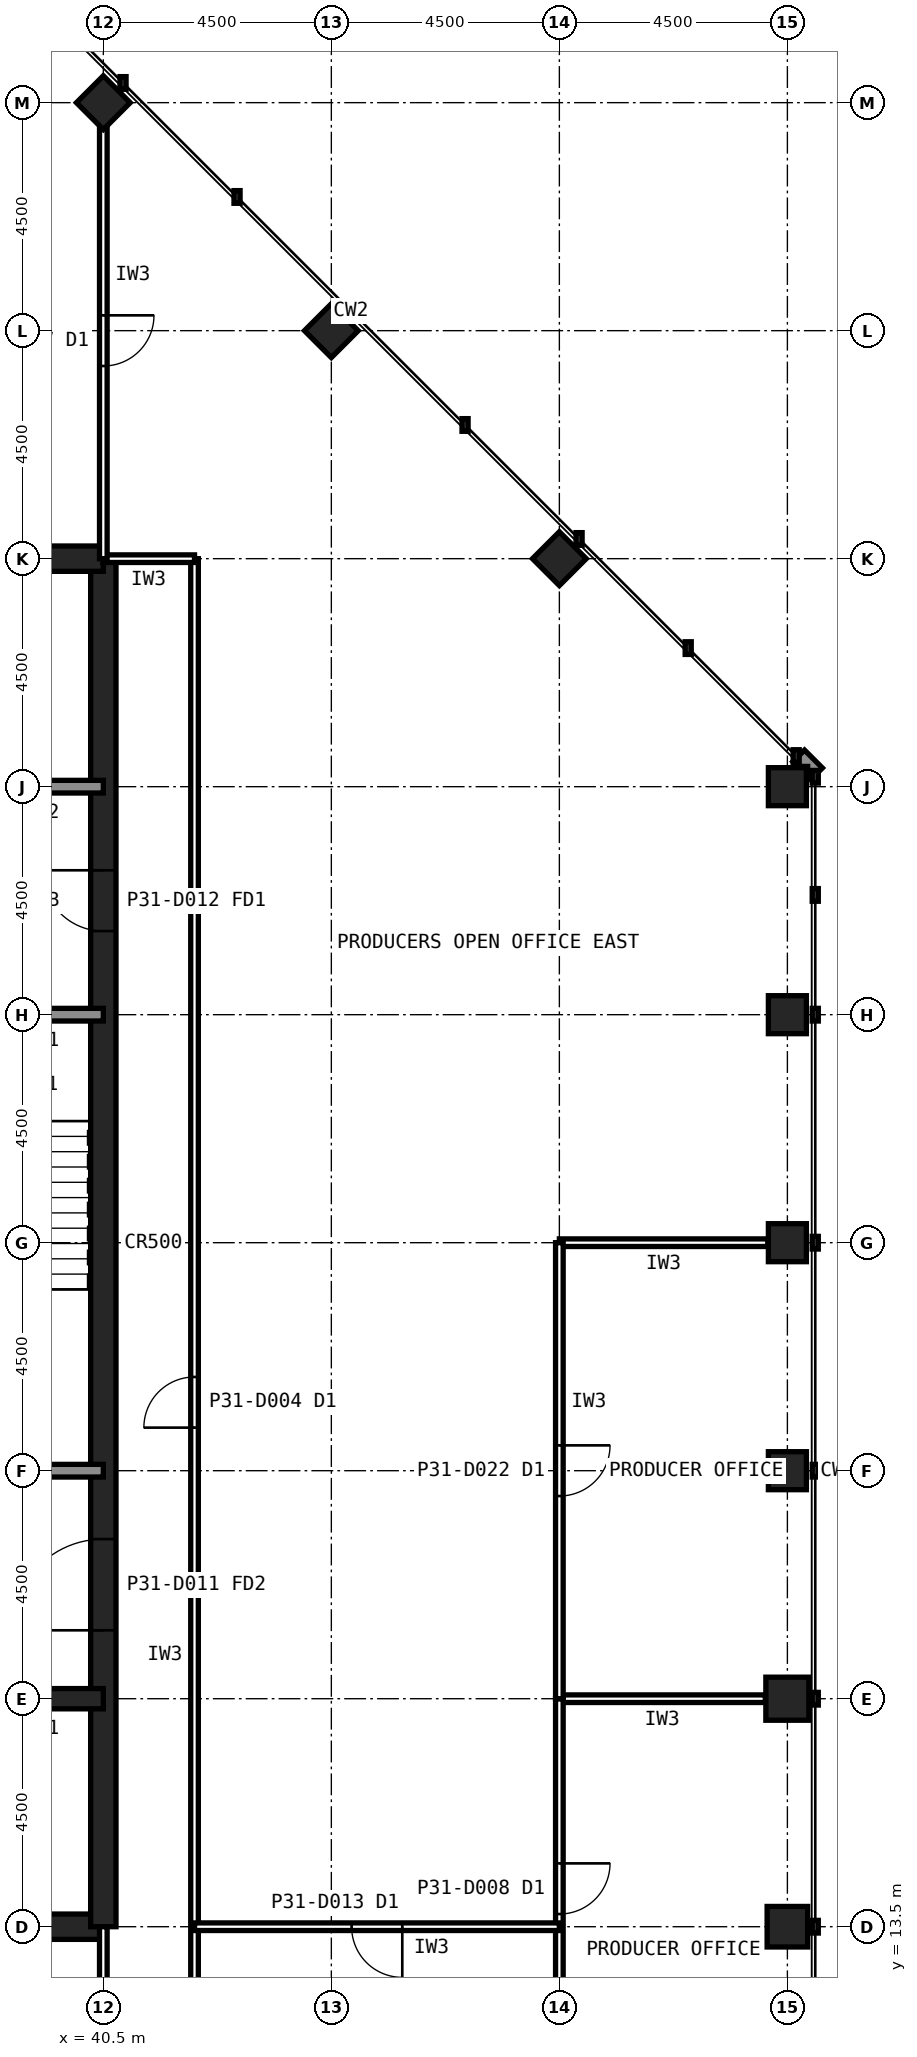
"""IFC4 building model, lengths in metres.
Left out: names, types, materials, properties, quantities, classifications, styles, units other than length and angle.
Written with IfcOpenShell. Run it as: python <this file> out.ifc"""

import sys

from ifc_helpers import new_model, si_unit, direction, frame, frame_2d, origin, origin_2d, place, context, subcontext, project, spatial, rectangle, hollow_rectangle, extrude, element, fill, save


model = new_model("IFC4")
c1 = context("Model", 3, precision=1e-05, world=origin(), true_north=direction((0.0, 1.0)))
c2 = subcontext(c1, "Body", "Model", "MODEL_VIEW")
j1 = project(units=[si_unit("LENGTHUNIT", "METRE"), si_unit("PLANEANGLEUNIT", "RADIAN")], contexts=[c1])
p1 = place(None, origin())
s1 = spatial("IfcSite", under=j1, at=p1, CompositionType="ELEMENT")
p2 = place(p1, origin())
s2 = spatial("IfcBuilding", under=s1, at=p2, CompositionType="ELEMENT")
p3 = place(p2, frame((0.0, 0.0, 135.6)))
s3 = spatial("IfcBuildingStorey", under=s2, at=p3, CompositionType="ELEMENT", Elevation=135.6)
p4 = place(p3, frame((54.0, 13.5, 0.0), z_axis=(0.0, 0.0, 1.0), x_axis=(1.0, 0.0, 0.0)))
e1 = element("IfcColumn", 1, at=p4, inside=s3, PredefinedType="COLUMN", context=c2, shape_type="SweptSolid", body=[
    extrude(hollow_rectangle(XDim=0.8, YDim=0.8, WallThickness=0.045, at=origin_2d()), origin(), (0.0, 0.0, 1.0), 4.0),
])
p5 = place(p3, frame((54.0, 18.0, 0.0), z_axis=(0.0, 0.0, 1.0), x_axis=(1.0, 0.0, 0.0)))
e2 = element("IfcColumn", 2, at=p5, inside=s3, PredefinedType="COLUMN", context=c2, shape_type="SweptSolid", body=[
    extrude(hollow_rectangle(XDim=0.85, YDim=0.85, WallThickness=0.05, at=origin_2d()), origin(), (0.0, 0.0, 1.0), 4.0),
])
for number, where, z_axis, x_axis in (
    (3, (54.0, 22.5, 0.0), (0.0, 0.0, 1.0), (1.0, 0.0, 0.0)),
    (4, (54.0, 27.0, 0.0), (0.0, 0.0, 1.0), (1.0, 0.0, 0.0)),
    (5, (54.0, 31.5, 0.0), (0.0, 0.0, 1.0), (1.0, 0.0, 0.0)),
    (6, (54.0, 36.0, 0.0), (0.0, 0.0, 1.0), (1.0, 0.0, 0.0)),
    (7, (49.5, 40.5, 0.0), (0.0, 0.0, 1.0), (0.707, 0.707, 0.0)),
    (8, (45.0, 45.0, 0.0), (0.0, 0.0, 1.0), (0.707, 0.707, 0.0)),
    (9, (40.5, 49.5, 0.0), (0.0, 0.0, 1.0), (0.707, 0.707, 0.0)),
):
    element("IfcColumn", number, at=place(p3, frame(where, z_axis=z_axis, x_axis=x_axis)), inside=s3, PredefinedType="COLUMN", context=c2, shape_type="SweptSolid", body=[
        extrude(hollow_rectangle(XDim=0.75, YDim=0.75, WallThickness=0.04, at=origin_2d()), origin(), (0.0, 0.0, 1.0), 4.0),
    ])
p6 = place(p3, frame((13.5, 13.5, 0.0), z_axis=(0.0, 0.0, 1.0), x_axis=(1.0, 0.0, 0.0)))
e10 = element("IfcWall", 10, at=p6, inside=s3, PredefinedType="SHEAR", context=c2, shape_type="SweptSolid", body=[
    extrude(rectangle(XDim=27.0, YDim=0.5, at=frame_2d((13.5, 0.0))), origin(), (0.0, 0.0, 1.0), 4.0),
])
p7 = place(p3, frame((40.5, 13.5, 0.0), z_axis=(0.0, 0.0, 1.0), x_axis=(0.0, 1.0, 0.0)))
e11 = element("IfcWall", 11, at=p7, inside=s3, PredefinedType="SHEAR", context=c2, shape_type="SweptSolid", body=[
    extrude(rectangle(XDim=27.0, YDim=0.5, at=frame_2d((13.5, 0.0))), origin(), (0.0, 0.0, 1.0), 4.0),
])
p8 = place(p7, frame((5.85, 0.0, 0.0)))
e12 = element("IfcOpeningElement", 12, at=p8, cuts=e11, PredefinedType="OPENING", context=c2, shape_type="SweptSolid", body=[
    extrude(rectangle(XDim=1.8, YDim=2.1, at=frame_2d((0.9, 1.05))), frame((0.0, 0.26, 0.0), z_axis=(0.0, -1.0, 0.0), x_axis=(1.0, 0.0, 0.0)), (0.0, 0.0, 1.0), 0.52),
])
p9 = place(p7, frame((19.65, 0.0, 0.0)))
e13 = element("IfcOpeningElement", 13, at=p9, cuts=e11, PredefinedType="OPENING", context=c2, shape_type="SweptSolid", body=[
    extrude(rectangle(XDim=1.2, YDim=2.1, at=frame_2d((0.6, 1.05))), frame((0.0, 0.26, 0.0), z_axis=(0.0, -1.0, 0.0), x_axis=(1.0, 0.0, 0.0)), (0.0, 0.0, 1.0), 0.52),
])
p10 = place(p3, frame((40.5, 40.5, 0.0), z_axis=(0.0, 0.0, 1.0), x_axis=(-1.0, 0.0, 0.0)))
e14 = element("IfcWall", 14, at=p10, inside=s3, PredefinedType="SHEAR", context=c2, shape_type="SweptSolid", body=[
    extrude(rectangle(XDim=27.0, YDim=0.5, at=frame_2d((13.5, 0.0))), origin(), (0.0, 0.0, 1.0), 4.0),
])
p11 = place(p3, frame((13.5, 18.0, 0.0), z_axis=(0.0, 0.0, 1.0), x_axis=(1.0, 0.0, 0.0)))
e15 = element("IfcWall", 15, at=p11, inside=s3, PredefinedType="SHEAR", context=c2, shape_type="SweptSolid", body=[
    extrude(rectangle(XDim=27.0, YDim=0.4, at=frame_2d((13.5, 0.0))), origin(), (0.0, 0.0, 1.0), 4.0),
])
p12 = place(p11, frame((24.3, 0.0, 0.0)))
e16 = element("IfcOpeningElement", 16, at=p12, cuts=e15, PredefinedType="OPENING", context=c2, shape_type="SweptSolid", body=[
    extrude(rectangle(XDim=0.9, YDim=2.1, at=frame_2d((0.45, 1.05))), frame((0.0, 0.21, 0.0), z_axis=(0.0, -1.0, 0.0), x_axis=(1.0, 0.0, 0.0)), (0.0, 0.0, 1.0), 0.42),
])
p13 = place(p11, frame((5.45, 0.0, 0.0)))
e17 = element("IfcOpeningElement", 17, at=p13, cuts=e15, PredefinedType="OPENING", context=c2, shape_type="SweptSolid", body=[
    extrude(rectangle(XDim=1.1, YDim=2.1, at=frame_2d((0.55, 1.05))), frame((0.0, 0.21, 0.0), z_axis=(0.0, -1.0, 0.0), x_axis=(1.0, 0.0, 0.0)), (0.0, 0.0, 1.0), 0.42),
])
p14 = place(p11, frame((8.45, 0.0, 0.0)))
e18 = element("IfcOpeningElement", 18, at=p14, cuts=e15, PredefinedType="OPENING", context=c2, shape_type="SweptSolid", body=[
    extrude(rectangle(XDim=1.1, YDim=2.1, at=frame_2d((0.55, 1.05))), frame((0.0, 0.21, 0.0), z_axis=(0.0, -1.0, 0.0), x_axis=(1.0, 0.0, 0.0)), (0.0, 0.0, 1.0), 0.42),
])
p15 = place(p11, frame((11.45, 0.0, 0.0)))
e19 = element("IfcOpeningElement", 19, at=p15, cuts=e15, PredefinedType="OPENING", context=c2, shape_type="SweptSolid", body=[
    extrude(rectangle(XDim=1.1, YDim=2.1, at=frame_2d((0.55, 1.05))), frame((0.0, 0.21, 0.0), z_axis=(0.0, -1.0, 0.0), x_axis=(1.0, 0.0, 0.0)), (0.0, 0.0, 1.0), 0.42),
])
p16 = place(p11, frame((14.45, 0.0, 0.0)))
e20 = element("IfcOpeningElement", 20, at=p16, cuts=e15, PredefinedType="OPENING", context=c2, shape_type="SweptSolid", body=[
    extrude(rectangle(XDim=1.1, YDim=2.1, at=frame_2d((0.55, 1.05))), frame((0.0, 0.21, 0.0), z_axis=(0.0, -1.0, 0.0), x_axis=(1.0, 0.0, 0.0)), (0.0, 0.0, 1.0), 0.42),
])
p17 = place(p11, frame((17.45, 0.0, 0.0)))
e21 = element("IfcOpeningElement", 21, at=p17, cuts=e15, PredefinedType="OPENING", context=c2, shape_type="SweptSolid", body=[
    extrude(rectangle(XDim=1.1, YDim=2.1, at=frame_2d((0.55, 1.05))), frame((0.0, 0.21, 0.0), z_axis=(0.0, -1.0, 0.0), x_axis=(1.0, 0.0, 0.0)), (0.0, 0.0, 1.0), 0.42),
])
p18 = place(p11, frame((20.45, 0.0, 0.0)))
e22 = element("IfcOpeningElement", 22, at=p18, cuts=e15, PredefinedType="OPENING", context=c2, shape_type="SweptSolid", body=[
    extrude(rectangle(XDim=1.1, YDim=2.1, at=frame_2d((0.55, 1.05))), frame((0.0, 0.21, 0.0), z_axis=(0.0, -1.0, 0.0), x_axis=(1.0, 0.0, 0.0)), (0.0, 0.0, 1.0), 0.42),
])
p19 = place(p11, frame((1.6, 0.0, 0.0)))
e23 = element("IfcOpeningElement", 23, at=p19, cuts=e15, PredefinedType="OPENING", context=c2, shape_type="SweptSolid", body=[
    extrude(rectangle(XDim=1.3, YDim=2.2, at=frame_2d((0.65, 1.1))), frame((0.0, 0.21, 0.0), z_axis=(0.0, -1.0, 0.0), x_axis=(1.0, 0.0, 0.0)), (0.0, 0.0, 1.0), 0.42),
])
p20 = place(p3, frame((13.5, 36.0, 0.0), z_axis=(0.0, 0.0, 1.0), x_axis=(1.0, 0.0, 0.0)))
e24 = element("IfcWall", 24, at=p20, inside=s3, PredefinedType="SOLIDWALL", context=c2, shape_type="SweptSolid", body=[
    extrude(rectangle(XDim=27.0, YDim=0.25, at=frame_2d((13.5, 0.0))), origin(), (0.0, 0.0, 1.0), 3.84),
])
p21 = place(p20, frame((1.8, 0.0, 0.0)))
e25 = element("IfcOpeningElement", 25, at=p21, cuts=e24, PredefinedType="OPENING", context=c2, shape_type="SweptSolid", body=[
    extrude(rectangle(XDim=0.9, YDim=2.1, at=frame_2d((0.45, 1.05))), frame((0.0, 0.135, 0.0), z_axis=(0.0, -1.0, 0.0), x_axis=(1.0, 0.0, 0.0)), (0.0, 0.0, 1.0), 0.27),
])
p22 = place(p20, frame((5.55, 0.0, 0.0)))
e26 = element("IfcOpeningElement", 26, at=p22, cuts=e24, PredefinedType="OPENING", context=c2, shape_type="SweptSolid", body=[
    extrude(rectangle(XDim=0.9, YDim=2.1, at=frame_2d((0.45, 1.05))), frame((0.0, 0.135, 0.0), z_axis=(0.0, -1.0, 0.0), x_axis=(1.0, 0.0, 0.0)), (0.0, 0.0, 1.0), 0.27),
])
p23 = place(p20, frame((8.55, 0.0, 0.0)))
e27 = element("IfcOpeningElement", 27, at=p23, cuts=e24, PredefinedType="OPENING", context=c2, shape_type="SweptSolid", body=[
    extrude(rectangle(XDim=0.9, YDim=2.1, at=frame_2d((0.45, 1.05))), frame((0.0, 0.135, 0.0), z_axis=(0.0, -1.0, 0.0), x_axis=(1.0, 0.0, 0.0)), (0.0, 0.0, 1.0), 0.27),
])
p24 = place(p20, frame((24.1, 0.0, 0.0)))
e28 = element("IfcOpeningElement", 28, at=p24, cuts=e24, PredefinedType="OPENING", context=c2, shape_type="SweptSolid", body=[
    extrude(rectangle(XDim=1.3, YDim=2.2, at=frame_2d((0.65, 1.1))), frame((0.0, 0.135, 0.0), z_axis=(0.0, -1.0, 0.0), x_axis=(1.0, 0.0, 0.0)), (0.0, 0.0, 1.0), 0.27),
])
p25 = place(p3, frame((13.5, 22.5, 0.0), z_axis=(0.0, 0.0, 1.0), x_axis=(1.0, 0.0, 0.0)))
e29 = element("IfcWall", 29, at=p25, inside=s3, PredefinedType="SOLIDWALL", context=c2, shape_type="SweptSolid", body=[
    extrude(rectangle(XDim=27.0, YDim=0.25, at=frame_2d((13.5, 0.0))), origin(), (0.0, 0.0, 1.0), 3.84),
])
p26 = place(p25, frame((1.65, 0.0, 0.0)))
e30 = element("IfcOpeningElement", 30, at=p26, cuts=e29, PredefinedType="OPENING", context=c2, shape_type="SweptSolid", body=[
    extrude(rectangle(XDim=1.2, YDim=2.1, at=frame_2d((0.6, 1.05))), frame((0.0, 0.135, 0.0), z_axis=(0.0, -1.0, 0.0), x_axis=(1.0, 0.0, 0.0)), (0.0, 0.0, 1.0), 0.27),
])
p27 = place(p25, frame((6.025, 0.0, 0.0)))
e31 = element("IfcOpeningElement", 31, at=p27, cuts=e29, PredefinedType="OPENING", context=c2, shape_type="SweptSolid", body=[
    extrude(rectangle(XDim=1.0, YDim=2.1, at=frame_2d((0.5, 1.05))), frame((0.0, 0.135, 0.0), z_axis=(0.0, -1.0, 0.0), x_axis=(1.0, 0.0, 0.0)), (0.0, 0.0, 1.0), 0.27),
])
p28 = place(p25, frame((10.525, 0.0, 0.0)))
e32 = element("IfcOpeningElement", 32, at=p28, cuts=e29, PredefinedType="OPENING", context=c2, shape_type="SweptSolid", body=[
    extrude(rectangle(XDim=1.0, YDim=2.1, at=frame_2d((0.5, 1.05))), frame((0.0, 0.135, 0.0), z_axis=(0.0, -1.0, 0.0), x_axis=(1.0, 0.0, 0.0)), (0.0, 0.0, 1.0), 0.27),
])
p29 = place(p25, frame((19.75, 0.0, 0.0)))
e33 = element("IfcOpeningElement", 33, at=p29, cuts=e29, PredefinedType="OPENING", context=c2, shape_type="SweptSolid", body=[
    extrude(rectangle(XDim=1.0, YDim=2.1, at=frame_2d((0.5, 1.05))), frame((0.0, 0.135, 0.0), z_axis=(0.0, -1.0, 0.0), x_axis=(1.0, 0.0, 0.0)), (0.0, 0.0, 1.0), 0.27),
])
p30 = place(p25, frame((15.05, 0.0, 0.0)))
e34 = element("IfcOpeningElement", 34, at=p30, cuts=e29, PredefinedType="OPENING", context=c2, shape_type="SweptSolid", body=[
    extrude(rectangle(XDim=1.4, YDim=2.4, at=frame_2d((0.7, 1.2))), frame((0.0, 0.135, 0.0), z_axis=(0.0, -1.0, 0.0), x_axis=(1.0, 0.0, 0.0)), (0.0, 0.0, 1.0), 0.27),
])
p31 = place(p3, frame((13.5, 31.5, 0.0), z_axis=(0.0, 0.0, 1.0), x_axis=(1.0, 0.0, 0.0)))
e35 = element("IfcWall", 35, at=p31, inside=s3, PredefinedType="SOLIDWALL", context=c2, shape_type="SweptSolid", body=[
    extrude(rectangle(XDim=27.0, YDim=0.25, at=frame_2d((13.5, 0.0))), origin(), (0.0, 0.0, 1.0), 3.84),
])
p32 = place(p31, frame((24.15, 0.0, 0.0)))
e36 = element("IfcOpeningElement", 36, at=p32, cuts=e35, PredefinedType="OPENING", context=c2, shape_type="SweptSolid", body=[
    extrude(rectangle(XDim=1.2, YDim=2.1, at=frame_2d((0.6, 1.05))), frame((0.0, 0.135, 0.0), z_axis=(0.0, -1.0, 0.0), x_axis=(1.0, 0.0, 0.0)), (0.0, 0.0, 1.0), 0.27),
])
p33 = place(p31, frame((15.3, 0.0, 0.0)))
e37 = element("IfcOpeningElement", 37, at=p33, cuts=e35, PredefinedType="OPENING", context=c2, shape_type="SweptSolid", body=[
    extrude(rectangle(XDim=0.9, YDim=2.1, at=frame_2d((0.45, 1.05))), frame((0.0, 0.135, 0.0), z_axis=(0.0, -1.0, 0.0), x_axis=(1.0, 0.0, 0.0)), (0.0, 0.0, 1.0), 0.27),
])
p34 = place(p31, frame((19.8, 0.0, 0.0)))
e38 = element("IfcOpeningElement", 38, at=p34, cuts=e35, PredefinedType="OPENING", context=c2, shape_type="SweptSolid", body=[
    extrude(rectangle(XDim=0.9, YDim=2.1, at=frame_2d((0.45, 1.05))), frame((0.0, 0.135, 0.0), z_axis=(0.0, -1.0, 0.0), x_axis=(1.0, 0.0, 0.0)), (0.0, 0.0, 1.0), 0.27),
])
p35 = place(p3, frame((42.3, 7.2, 0.0), z_axis=(0.0, 0.0, 1.0), x_axis=(0.0, 1.0, 0.0)))
e39 = element("IfcWall", 39, at=p35, inside=s3, PredefinedType="PARTITIONING", context=c2, shape_type="SweptSolid", body=[
    extrude(rectangle(XDim=33.3, YDim=0.15, at=frame_2d((16.65, 0.0))), origin(), (0.0, 0.0, 1.0), 3.84),
])
p36 = place(p35, frame((16.15, 0.0, 0.0)))
e40 = element("IfcOpeningElement", 40, at=p36, cuts=e39, PredefinedType="OPENING", context=c2, shape_type="SweptSolid", body=[
    extrude(rectangle(XDim=1.0, YDim=2.1, at=frame_2d((0.5, 1.05))), frame((0.0, 0.085, 0.0), z_axis=(0.0, -1.0, 0.0), x_axis=(1.0, 0.0, 0.0)), (0.0, 0.0, 1.0), 0.17),
])
p37 = place(p3, frame((42.3, 40.5, 0.0), z_axis=(0.0, 0.0, 1.0), x_axis=(-1.0, 0.0, 0.0)))
e41 = element("IfcWall", 41, at=p37, inside=s3, PredefinedType="PARTITIONING", context=c2, shape_type="SweptSolid", body=[
    extrude(rectangle(XDim=1.81, YDim=0.15, at=frame_2d((0.905, 0.0))), origin(), (0.0, 0.0, 1.0), 2.989),
])
p38 = place(p3, frame((40.5, 9.0, 0.0), z_axis=(0.0, 0.0, 1.0), x_axis=(0.0, 1.0, 0.0)))
e42 = element("IfcWall", 42, at=p38, inside=s3, PredefinedType="PARTITIONING", context=c2, shape_type="SweptSolid", body=[
    extrude(rectangle(XDim=4.5, YDim=0.15, at=frame_2d((2.25, 0.0))), origin(), (0.0, 0.0, 1.0), 2.989),
])
p39 = place(p3, frame((53.565, 18.0, 0.0), z_axis=(0.0, 0.0, 1.0), x_axis=(-1.0, 0.0, 0.0)))
e43 = element("IfcWall", 43, at=p39, inside=s3, PredefinedType="PARTITIONING", context=c2, shape_type="SweptSolid", body=[
    extrude(rectangle(XDim=4.065, YDim=0.15, at=frame_2d((2.032, 0.0))), origin(), (0.0, 0.0, 1.0), 2.989),
])
p40 = place(p3, frame((49.5, 18.0, 0.0), z_axis=(0.0, 0.0, 1.0), x_axis=(0.0, -1.0, 0.0)))
e44 = element("IfcWall", 44, at=p40, inside=s3, PredefinedType="PARTITIONING", context=c2, shape_type="SweptSolid", body=[
    extrude(rectangle(XDim=9.0, YDim=0.15, at=frame_2d((4.5, 0.0))), origin(), (0.0, 0.0, 1.0), 3.84),
])
p41 = place(p40, frame((3.25, 0.0, 0.0)))
e45 = element("IfcOpeningElement", 45, at=p41, cuts=e44, PredefinedType="OPENING", context=c2, shape_type="SweptSolid", body=[
    extrude(rectangle(XDim=1.0, YDim=2.1, at=frame_2d((0.5, 1.05))), frame((0.0, 0.085, 0.0), z_axis=(0.0, -1.0, 0.0), x_axis=(1.0, 0.0, 0.0)), (0.0, 0.0, 1.0), 0.17),
])
p42 = place(p3, frame((53.615, 27.0, 0.0), z_axis=(0.0, 0.0, 1.0), x_axis=(-1.0, 0.0, 0.0)))
e46 = element("IfcWall", 46, at=p42, inside=s3, PredefinedType="PARTITIONING", context=c2, shape_type="SweptSolid", body=[
    extrude(rectangle(XDim=4.115, YDim=0.15, at=frame_2d((2.058, 0.0))), origin(), (0.0, 0.0, 1.0), 2.989),
])
p43 = place(p3, frame((49.5, 27.0, 0.0), z_axis=(0.0, 0.0, 1.0), x_axis=(0.0, -1.0, 0.0)))
e47 = element("IfcWall", 47, at=p43, inside=s3, PredefinedType="PARTITIONING", context=c2, shape_type="SweptSolid", body=[
    extrude(rectangle(XDim=9.0, YDim=0.15, at=frame_2d((4.5, 0.0))), origin(), (0.0, 0.0, 1.0), 3.84),
])
p44 = place(p43, frame((4.0, 0.0, 0.0)))
e48 = element("IfcOpeningElement", 48, at=p44, cuts=e47, PredefinedType="OPENING", context=c2, shape_type="SweptSolid", body=[
    extrude(rectangle(XDim=1.0, YDim=2.1, at=frame_2d((0.5, 1.05))), frame((0.0, 0.085, 0.0), z_axis=(0.0, -1.0, 0.0), x_axis=(1.0, 0.0, 0.0)), (0.0, 0.0, 1.0), 0.17),
])
p45 = place(p3, frame((40.5, 49.105, 0.0), z_axis=(0.0, 0.0, 1.0), x_axis=(0.0, -1.0, 0.0)))
e49 = element("IfcWall", 49, at=p45, inside=s3, PredefinedType="PARTITIONING", context=c2, shape_type="SweptSolid", body=[
    extrude(rectangle(XDim=8.605, YDim=0.15, at=frame_2d((4.302, 0.0))), origin(), (0.0, 0.0, 1.0), 2.989),
])
p46 = place(p45, frame((3.802, 0.0, 0.0)))
e50 = element("IfcOpeningElement", 50, at=p46, cuts=e49, PredefinedType="OPENING", context=c2, shape_type="SweptSolid", body=[
    extrude(rectangle(XDim=1.0, YDim=2.1, at=frame_2d((0.5, 1.05))), frame((0.0, 0.085, 0.0), z_axis=(0.0, -1.0, 0.0), x_axis=(1.0, 0.0, 0.0)), (0.0, 0.0, 1.0), 0.17),
])
p47 = place(p3, frame((49.5, 13.5, 0.0), z_axis=(0.0, 0.0, 1.0), x_axis=(-1.0, 0.0, 0.0)))
e51 = element("IfcWall", 51, at=p47, inside=s3, PredefinedType="PARTITIONING", context=c2, shape_type="SweptSolid", body=[
    extrude(rectangle(XDim=7.2, YDim=0.15, at=frame_2d((3.6, 0.0))), origin(), (0.0, 0.0, 1.0), 2.989),
])
p48 = place(p47, frame((3.1, 0.0, 0.0)))
e52 = element("IfcOpeningElement", 52, at=p48, cuts=e51, PredefinedType="OPENING", context=c2, shape_type="SweptSolid", body=[
    extrude(rectangle(XDim=1.0, YDim=2.1, at=frame_2d((0.5, 1.05))), frame((0.0, 0.085, 0.0), z_axis=(0.0, -1.0, 0.0), x_axis=(1.0, 0.0, 0.0)), (0.0, 0.0, 1.0), 0.17),
])
p49 = place(p8, origin())
e53 = element("IfcDoor", 53, at=p49, inside=s3, OperationType="SINGLE_SWING_LEFT", PredefinedType="DOOR", context=c2, shape_type="SweptSolid", body=[
    extrude(rectangle(XDim=1.8, YDim=2.1, at=frame_2d((0.9, 1.05))), frame((0.0, 0.025, 0.0), z_axis=(0.0, -1.0, 0.0), x_axis=(1.0, 0.0, 0.0)), (0.0, 0.0, 1.0), 0.05),
])
fill(e12, e53)
p50 = place(p9, origin())
e54 = element("IfcDoor", 54, at=p50, inside=s3, OperationType="SINGLE_SWING_RIGHT", PredefinedType="DOOR", context=c2, shape_type="SweptSolid", body=[
    extrude(rectangle(XDim=1.2, YDim=2.1, at=frame_2d((0.6, 1.05))), frame((0.0, 0.025, 0.0), z_axis=(0.0, -1.0, 0.0), x_axis=(1.0, 0.0, 0.0)), (0.0, 0.0, 1.0), 0.05),
])
fill(e13, e54)
p51 = place(p36, origin())
e55 = element("IfcDoor", 55, at=p51, inside=s3, OperationType="SINGLE_SWING_LEFT", PredefinedType="DOOR", context=c2, shape_type="SweptSolid", body=[
    extrude(rectangle(XDim=1.0, YDim=2.1, at=frame_2d((0.5, 1.05))), frame((0.0, 0.025, 0.0), z_axis=(0.0, -1.0, 0.0), x_axis=(1.0, 0.0, 0.0)), (0.0, 0.0, 1.0), 0.05),
])
fill(e40, e55)
p52 = place(p41, origin())
e56 = element("IfcDoor", 56, at=p52, inside=s3, OperationType="SINGLE_SWING_LEFT", PredefinedType="DOOR", context=c2, shape_type="SweptSolid", body=[
    extrude(rectangle(XDim=1.0, YDim=2.1, at=frame_2d((0.5, 1.05))), frame((0.0, 0.025, 0.0), z_axis=(0.0, -1.0, 0.0), x_axis=(1.0, 0.0, 0.0)), (0.0, 0.0, 1.0), 0.05),
])
fill(e45, e56)
p53 = place(p44, origin())
e57 = element("IfcDoor", 57, at=p53, inside=s3, OperationType="SINGLE_SWING_LEFT", PredefinedType="DOOR", context=c2, shape_type="SweptSolid", body=[
    extrude(rectangle(XDim=1.0, YDim=2.1, at=frame_2d((0.5, 1.05))), frame((0.0, 0.025, 0.0), z_axis=(0.0, -1.0, 0.0), x_axis=(1.0, 0.0, 0.0)), (0.0, 0.0, 1.0), 0.05),
])
fill(e48, e57)
p54 = place(p46, origin())
e58 = element("IfcDoor", 58, at=p54, inside=s3, OperationType="SINGLE_SWING_LEFT", PredefinedType="DOOR", context=c2, shape_type="SweptSolid", body=[
    extrude(rectangle(XDim=1.0, YDim=2.1, at=frame_2d((0.5, 1.05))), frame((0.0, 0.025, 0.0), z_axis=(0.0, -1.0, 0.0), x_axis=(1.0, 0.0, 0.0)), (0.0, 0.0, 1.0), 0.05),
])
fill(e50, e58)
p55 = place(p48, origin())
e59 = element("IfcDoor", 59, at=p55, inside=s3, OperationType="SINGLE_SWING_LEFT", PredefinedType="DOOR", context=c2, shape_type="SweptSolid", body=[
    extrude(rectangle(XDim=1.0, YDim=2.1, at=frame_2d((0.5, 1.05))), frame((0.0, 0.025, 0.0), z_axis=(0.0, -1.0, 0.0), x_axis=(1.0, 0.0, 0.0)), (0.0, 0.0, 1.0), 0.05),
])
fill(e52, e59)
save(model, sys.argv[1])
